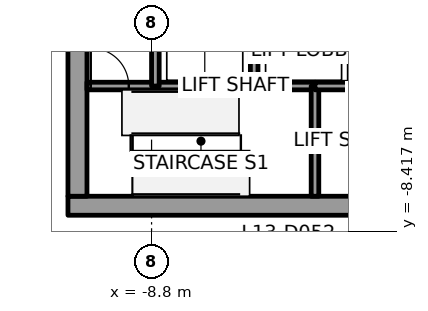
"""IFC4 building model, lengths in metres.
Left out: names, types, materials, properties, quantities, classifications, styles, units other than length and angle.
Written with IfcOpenShell. Run it as: python <this file> out.ifc"""

import sys

from ifc_helpers import new_model, si_unit, direction, frame, frame_2d, origin, place, context, subcontext, project, spatial, rectangle, extrude, element, fill, save


model = new_model("IFC4")
c1 = context("Model", 3, precision=1e-05, world=origin(), true_north=direction((0.0, 1.0)))
c2 = subcontext(c1, "Body", "Model", "MODEL_VIEW")
j1 = project(units=[si_unit("LENGTHUNIT", "METRE"), si_unit("PLANEANGLEUNIT", "RADIAN")], contexts=[c1])
p1 = place(None, origin())
s1 = spatial("IfcSite", under=j1, at=p1, CompositionType="ELEMENT")
p2 = place(p1, origin())
s2 = spatial("IfcBuilding", under=s1, at=p2, CompositionType="ELEMENT")
p3 = place(p2, frame((0.0, 0.0, 70.2)))
s3 = spatial("IfcBuildingStorey", under=s2, at=p3, CompositionType="ELEMENT", Elevation=70.2)
p4 = place(p3, frame((-11.0, -7.75, 0.0), z_axis=(0.0, 0.0, 1.0), x_axis=(1.0, 0.0, 0.0)))
e1 = element("IfcWall", 1, at=p4, inside=s3, PredefinedType="SHEAR", context=c2, shape_type="SweptSolid", body=[
    extrude(rectangle(XDim=22.0, YDim=0.5, at=frame_2d((11.0, 0.0))), origin(), (0.0, 0.0, 1.0), 3.7),
])
p5 = place(p4, frame((10.45, 0.0, 0.0)))
e2 = element("IfcOpeningElement", 2, at=p5, cuts=e1, PredefinedType="OPENING", context=c2, shape_type="SweptSolid", body=[
    extrude(rectangle(XDim=1.1, YDim=2.1, at=frame_2d((0.55, 1.05))), frame((0.0, 0.25, 0.0), z_axis=(0.0, -1.0, 0.0), x_axis=(1.0, 0.0, 0.0)), (0.0, 0.0, 1.0), 0.5),
])
p6 = place(p3, frame((-10.75, -7.5, 0.0), z_axis=(0.0, 0.0, 1.0), x_axis=(0.0, 1.0, 0.0)))
e3 = element("IfcWall", 3, at=p6, inside=s3, PredefinedType="SHEAR", context=c2, shape_type="SweptSolid", body=[
    extrude(rectangle(XDim=15.0, YDim=0.5, at=frame_2d((7.5, 0.0))), origin(), (0.0, 0.0, 1.0), 3.7),
])
p7 = place(p6, frame((6.6, 0.0, 0.0)))
e4 = element("IfcOpeningElement", 4, at=p7, cuts=e3, PredefinedType="OPENING", context=c2, shape_type="SweptSolid", body=[
    extrude(rectangle(XDim=1.8, YDim=2.1, at=frame_2d((0.9, 1.05))), frame((0.0, 0.25, 0.0), z_axis=(0.0, -1.0, 0.0), x_axis=(1.0, 0.0, 0.0)), (0.0, 0.0, 1.0), 0.5),
])
p8 = place(p3, frame((-10.5, -4.6, 0.0), z_axis=(0.0, 0.0, 1.0), x_axis=(1.0, 0.0, 0.0)))
e5 = element("IfcWall", 5, at=p8, inside=s3, PredefinedType="SOLIDWALL", context=c2, shape_type="SweptSolid", body=[
    extrude(rectangle(XDim=1.8, YDim=0.2, at=frame_2d((0.9, 0.0))), origin(), (0.0, 0.0, 1.0), 3.55),
])
p9 = place(p8, frame((0.1, 0.0, 0.0)))
e6 = element("IfcOpeningElement", 6, at=p9, cuts=e5, PredefinedType="OPENING", context=c2, shape_type="SweptSolid", body=[
    extrude(rectangle(XDim=1.0, YDim=2.1, at=frame_2d((0.5, 1.05))), frame((0.0, 0.1, 0.0), z_axis=(0.0, -1.0, 0.0), x_axis=(1.0, 0.0, 0.0)), (0.0, 0.0, 1.0), 0.2),
])
p10 = place(p3, frame((-8.7, -4.6, 0.0), z_axis=(0.0, 0.0, 1.0), x_axis=(1.0, 0.0, 0.0)))
e7 = element("IfcWall", 7, at=p10, inside=s3, PredefinedType="SOLIDWALL", context=c2, shape_type="SweptSolid", body=[
    extrude(rectangle(XDim=2.6, YDim=0.2, at=frame_2d((1.3, 0.0))), origin(), (0.0, 0.0, 1.0), 3.55),
])
p11 = place(p3, frame((-8.7, -4.6, 0.0), z_axis=(0.0, 0.0, 1.0), x_axis=(0.0, 1.0, 0.0)))
e8 = element("IfcWall", 8, at=p11, inside=s3, PredefinedType="SOLIDWALL", context=c2, shape_type="SweptSolid", body=[
    extrude(rectangle(XDim=2.8, YDim=0.2, at=frame_2d((1.4, 0.0))), origin(), (0.0, 0.0, 1.0), 3.55),
])
p12 = place(p3, frame((-6.1, -4.6, 0.0), z_axis=(0.0, 0.0, 1.0), x_axis=(1.0, 0.0, 0.0)))
e9 = element("IfcWall", 9, at=p12, inside=s3, PredefinedType="SOLIDWALL", context=c2, shape_type="SweptSolid", body=[
    extrude(rectangle(XDim=1.6, YDim=0.2, at=frame_2d((0.8, 0.0))), origin(), (0.0, 0.0, 1.0), 3.55),
])
p13 = place(p3, frame((-6.1, -4.6, 0.0), z_axis=(0.0, 0.0, 1.0), x_axis=(0.0, 1.0, 0.0)))
e10 = element("IfcWall", 10, at=p13, inside=s3, PredefinedType="SOLIDWALL", context=c2, shape_type="SweptSolid", body=[
    extrude(rectangle(XDim=2.8, YDim=0.2, at=frame_2d((1.4, 0.0))), origin(), (0.0, 0.0, 1.0), 3.55),
])
p14 = place(p3, frame((-4.5, -4.6, 0.0), z_axis=(0.0, 0.0, 1.0), x_axis=(0.0, -1.0, 0.0)))
e11 = element("IfcWall", 11, at=p14, inside=s3, PredefinedType="SOLIDWALL", context=c2, shape_type="SweptSolid", body=[
    extrude(rectangle(XDim=2.9, YDim=0.2, at=frame_2d((1.45, 0.0))), origin(), (0.0, 0.0, 1.0), 3.55),
])
p15 = place(p3, frame((-4.5, -4.6, 0.0), z_axis=(0.0, 0.0, 1.0), x_axis=(1.0, 0.0, 0.0)))
e12 = element("IfcWall", 12, at=p15, inside=s3, PredefinedType="SOLIDWALL", context=c2, shape_type="SweptSolid", body=[
    extrude(rectangle(XDim=1.0, YDim=0.2, at=frame_2d((0.5, 0.0))), origin(), (0.0, 0.0, 1.0), 3.55),
])
p16 = place(p9, origin())
e13 = element("IfcDoor", 13, at=p16, inside=s3, OperationType="SINGLE_SWING_LEFT", PredefinedType="DOOR", context=c2, shape_type="SweptSolid", body=[
    extrude(rectangle(XDim=1.0, YDim=2.1, at=frame_2d((0.5, 1.05))), frame((0.0, 0.025, 0.0), z_axis=(0.0, -1.0, 0.0), x_axis=(1.0, 0.0, 0.0)), (0.0, 0.0, 1.0), 0.05),
])
fill(e6, e13)
save(model, sys.argv[1])
